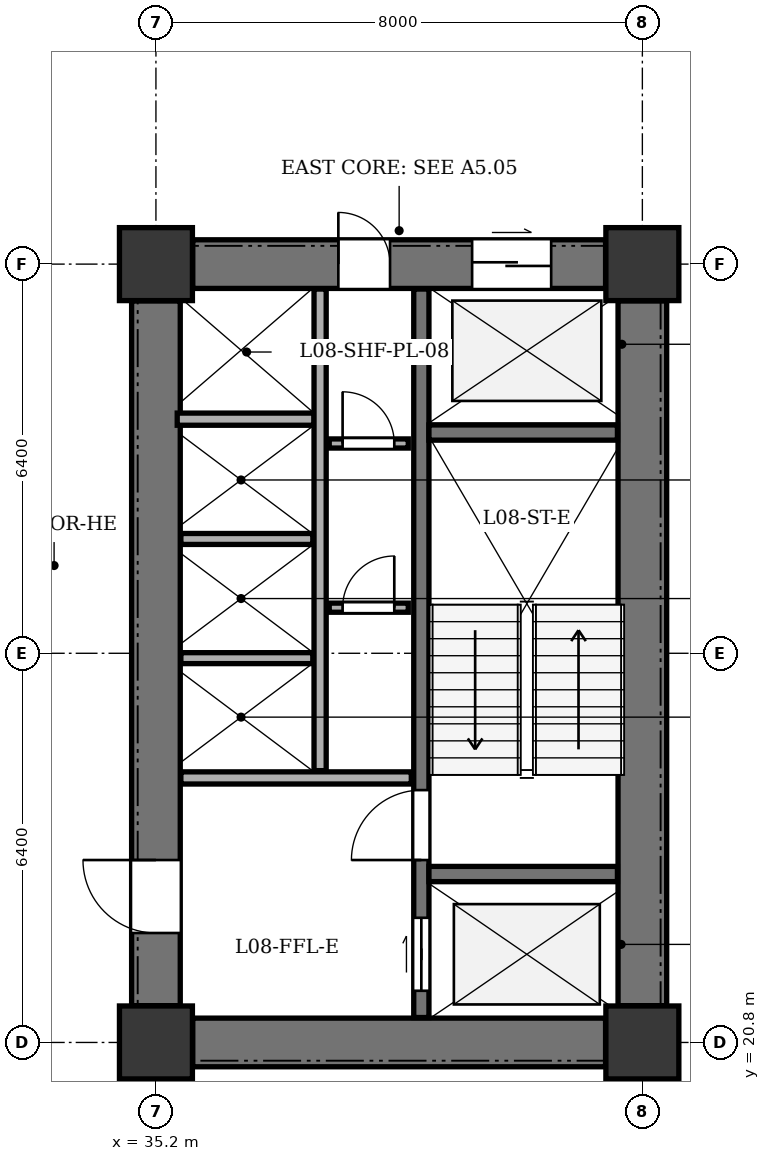
"""IFC4 building model, lengths in metres.
Left out: names, types, materials, properties, quantities, classifications, styles, units other than length and angle.
Written with IfcOpenShell. Run it as: python <this file> out.ifc"""

import sys

from ifc_helpers import new_model, si_unit, direction, frame, frame_2d, origin, origin_2d, place, context, subcontext, project, spatial, rectangle, extrude, element, fill, save


model = new_model("IFC4")
c1 = context("Model", 3, precision=1e-05, world=origin(), true_north=direction((0.0, 1.0)))
c2 = subcontext(c1, "Body", "Model", "MODEL_VIEW")
j1 = project(units=[si_unit("LENGTHUNIT", "METRE"), si_unit("PLANEANGLEUNIT", "RADIAN")], contexts=[c1])
p1 = place(None, origin())
s1 = spatial("IfcSite", under=j1, at=p1, CompositionType="ELEMENT")
p2 = place(p1, origin())
s2 = spatial("IfcBuilding", under=s1, at=p2, CompositionType="ELEMENT")
p3 = place(p2, frame((0.0, 0.0, 36.0)))
s3 = spatial("IfcBuildingStorey", under=s2, at=p3, CompositionType="ELEMENT", Elevation=36.0)
for number, where, z_axis, x_axis in (
    (1, (35.2, 20.8, 0.0), (0.0, 0.0, 1.0), (1.0, 0.0, 0.0)),
    (2, (43.2, 20.8, 0.0), (0.0, 0.0, 1.0), (1.0, 0.0, 0.0)),
    (3, (35.2, 33.6, 0.0), (0.0, 0.0, 1.0), (1.0, 0.0, 0.0)),
    (4, (43.2, 33.6, 0.0), (0.0, 0.0, 1.0), (1.0, 0.0, 0.0)),
):
    element("IfcColumn", number, at=place(p3, frame(where, z_axis=z_axis, x_axis=x_axis)), inside=s3, PredefinedType="COLUMN", context=c2, shape_type="SweptSolid", body=[
        extrude(rectangle(XDim=1.2, YDim=1.2, at=origin_2d()), origin(), (0.0, 0.0, 1.0), 3.9),
    ])
p4 = place(p3, frame((43.2, 21.405, 0.0), z_axis=(0.0, 0.0, 1.0), x_axis=(0.0, 1.0, 0.0)))
e5 = element("IfcWall", 5, at=p4, inside=s3, PredefinedType="SHEAR", context=c2, shape_type="SweptSolid", body=[
    extrude(rectangle(XDim=11.59, YDim=0.8, at=frame_2d((5.795, 0.0))), origin(), (0.0, 0.0, 1.0), 3.6),
])
p5 = place(p3, frame((35.805, 20.8, 0.0), z_axis=(0.0, 0.0, 1.0), x_axis=(1.0, 0.0, 0.0)))
e6 = element("IfcWall", 6, at=p5, inside=s3, PredefinedType="SHEAR", context=c2, shape_type="SweptSolid", body=[
    extrude(rectangle(XDim=6.79, YDim=0.8, at=frame_2d((3.395, 0.0))), origin(), (0.0, 0.0, 1.0), 3.6),
])
p6 = place(p3, frame((35.805, 33.6, 0.0), z_axis=(0.0, 0.0, 1.0), x_axis=(1.0, 0.0, 0.0)))
e7 = element("IfcWall", 7, at=p6, inside=s3, PredefinedType="SHEAR", context=c2, shape_type="SweptSolid", body=[
    extrude(rectangle(XDim=6.79, YDim=0.8, at=frame_2d((3.395, 0.0))), origin(), (0.0, 0.0, 1.0), 3.6),
])
p7 = place(p6, frame((4.595, 0.0, 0.0)))
e8 = element("IfcOpeningElement", 8, at=p7, cuts=e7, PredefinedType="OPENING", context=c2, shape_type="SweptSolid", body=[
    extrude(rectangle(XDim=1.3, YDim=2.15, at=frame_2d((0.65, 1.075))), frame((0.0, 0.41, 0.0), z_axis=(0.0, -1.0, 0.0), x_axis=(1.0, 0.0, 0.0)), (0.0, 0.0, 1.0), 0.82),
])
p8 = place(p6, frame((2.395, 0.0, 0.0)))
e9 = element("IfcOpeningElement", 9, at=p8, cuts=e7, PredefinedType="OPENING", context=c2, shape_type="SweptSolid", body=[
    extrude(rectangle(XDim=0.85, YDim=2.02, at=frame_2d((0.425, 1.01))), frame((0.0, 0.41, 0.0), z_axis=(0.0, -1.0, 0.0), x_axis=(1.0, 0.0, 0.0)), (0.0, 0.0, 1.0), 0.82),
])
p9 = place(p3, frame((35.2, 21.405, 0.0), z_axis=(0.0, 0.0, 1.0), x_axis=(0.0, 1.0, 0.0)))
e10 = element("IfcWall", 10, at=p9, inside=s3, PredefinedType="SHEAR", context=c2, shape_type="SweptSolid", body=[
    extrude(rectangle(XDim=11.59, YDim=0.8, at=frame_2d((5.795, 0.0))), origin(), (0.0, 0.0, 1.0), 3.6),
])
p10 = place(p9, frame((1.195, 0.0, 0.0)))
e11 = element("IfcOpeningElement", 11, at=p10, cuts=e10, PredefinedType="OPENING", context=c2, shape_type="SweptSolid", body=[
    extrude(rectangle(XDim=1.2, YDim=2.15, at=frame_2d((0.6, 1.075))), frame((0.0, 0.41, 0.0), z_axis=(0.0, -1.0, 0.0), x_axis=(1.0, 0.0, 0.0)), (0.0, 0.0, 1.0), 0.82),
])
p11 = place(p3, frame((39.565, 21.21, 0.0), z_axis=(0.0, 0.0, 1.0), x_axis=(0.0, 1.0, 0.0)))
e12 = element("IfcWall", 12, at=p11, inside=s3, PredefinedType="SHEAR", context=c2, shape_type="SweptSolid", body=[
    extrude(rectangle(XDim=11.98, YDim=0.25, at=frame_2d((5.99, 0.0))), origin(), (0.0, 0.0, 1.0), 3.6),
])
p12 = place(p11, frame((0.44, 0.0, 0.0)))
e13 = element("IfcOpeningElement", 13, at=p12, cuts=e12, PredefinedType="OPENING", context=c2, shape_type="SweptSolid", body=[
    extrude(rectangle(XDim=1.2, YDim=2.15, at=frame_2d((0.6, 1.075))), frame((0.0, 0.135, 0.0), z_axis=(0.0, -1.0, 0.0), x_axis=(1.0, 0.0, 0.0)), (0.0, 0.0, 1.0), 0.27),
])
p13 = place(p11, frame((2.59, 0.0, 0.0)))
e14 = element("IfcOpeningElement", 14, at=p13, cuts=e12, PredefinedType="OPENING", context=c2, shape_type="SweptSolid", body=[
    extrude(rectangle(XDim=1.15, YDim=2.15, at=frame_2d((0.575, 1.075))), frame((0.0, 0.135, 0.0), z_axis=(0.0, -1.0, 0.0), x_axis=(1.0, 0.0, 0.0)), (0.0, 0.0, 1.0), 0.27),
])
for number, where, z_axis, x_axis in (
    (15, (39.69, 23.57, 0.0), (0.0, 0.0, 1.0), (1.0, 0.0, 0.0)),
    (16, (39.69, 30.83, 0.0), (0.0, 0.0, 1.0), (1.0, 0.0, 0.0)),
):
    element("IfcWall", number, at=place(p3, frame(where, z_axis=z_axis, x_axis=x_axis)), inside=s3, PredefinedType="SHEAR", context=c2, shape_type="SweptSolid", body=[
        extrude(rectangle(XDim=3.1, YDim=0.25, at=frame_2d((1.55, 0.0))), origin(), (0.0, 0.0, 1.0), 3.6),
    ])
p14 = place(p3, frame((35.61, 25.15, 0.0), z_axis=(0.0, 0.0, 1.0), x_axis=(1.0, 0.0, 0.0)))
e17 = element("IfcWall", 17, at=p14, inside=s3, PredefinedType="SOLIDWALL", context=c2, shape_type="SweptSolid", body=[
    extrude(rectangle(XDim=3.79, YDim=0.2, at=frame_2d((1.895, 0.0))), origin(), (0.0, 0.0, 1.0), 3.6),
])
p15 = place(p3, frame((35.55, 31.05, 0.0), z_axis=(0.0, 0.0, 1.0), x_axis=(1.0, 0.0, 0.0)))
e18 = element("IfcWall", 18, at=p15, inside=s3, PredefinedType="SOLIDWALL", context=c2, shape_type="SweptSolid", body=[
    extrude(rectangle(XDim=2.25, YDim=0.2, at=frame_2d((1.125, 0.0))), origin(), (0.0, 0.0, 1.0), 3.6),
])
p16 = place(p3, frame((37.9, 25.27, 0.0), z_axis=(0.0, 0.0, 1.0), x_axis=(0.0, 1.0, 0.0)))
e19 = element("IfcWall", 19, at=p16, inside=s3, PredefinedType="SOLIDWALL", context=c2, shape_type="SweptSolid", body=[
    extrude(rectangle(XDim=7.92, YDim=0.2, at=frame_2d((3.96, 0.0))), origin(), (0.0, 0.0, 1.0), 3.6),
])
for number, where, z_axis, x_axis in (
    (20, (35.61, 27.12, 0.0), (0.0, 0.0, 1.0), (1.0, 0.0, 0.0)),
    (21, (35.61, 29.08, 0.0), (0.0, 0.0, 1.0), (1.0, 0.0, 0.0)),
):
    element("IfcWall", number, at=place(p3, frame(where, z_axis=z_axis, x_axis=x_axis)), inside=s3, PredefinedType="PARTITIONING", context=c2, shape_type="SweptSolid", body=[
        extrude(rectangle(XDim=2.17, YDim=0.18, at=frame_2d((1.085, 0.0))), origin(), (0.0, 0.0, 1.0), 3.6),
    ])
p17 = place(p3, frame((38.05, 27.95, 0.0), z_axis=(0.0, 0.0, 1.0), x_axis=(1.0, 0.0, 0.0)))
e22 = element("IfcWall", 22, at=p17, inside=s3, PredefinedType="PARTITIONING", context=c2, shape_type="SweptSolid", body=[
    extrude(rectangle(XDim=1.3, YDim=0.15, at=frame_2d((0.65, 0.0))), origin(), (0.0, 0.0, 1.0), 3.6),
])
p18 = place(p17, frame((0.22, 0.0, 0.0)))
e23 = element("IfcOpeningElement", 23, at=p18, cuts=e22, PredefinedType="OPENING", context=c2, shape_type="SweptSolid", body=[
    extrude(rectangle(XDim=0.85, YDim=2.02, at=frame_2d((0.425, 1.01))), frame((0.0, 0.085, 0.0), z_axis=(0.0, -1.0, 0.0), x_axis=(1.0, 0.0, 0.0)), (0.0, 0.0, 1.0), 0.17),
])
p19 = place(p3, frame((38.05, 30.65, 0.0), z_axis=(0.0, 0.0, 1.0), x_axis=(1.0, 0.0, 0.0)))
e24 = element("IfcWall", 24, at=p19, inside=s3, PredefinedType="PARTITIONING", context=c2, shape_type="SweptSolid", body=[
    extrude(rectangle(XDim=1.3, YDim=0.15, at=frame_2d((0.65, 0.0))), origin(), (0.0, 0.0, 1.0), 3.6),
])
p20 = place(p19, frame((0.22, 0.0, 0.0)))
e25 = element("IfcOpeningElement", 25, at=p20, cuts=e24, PredefinedType="OPENING", context=c2, shape_type="SweptSolid", body=[
    extrude(rectangle(XDim=0.85, YDim=2.02, at=frame_2d((0.425, 1.01))), frame((0.0, 0.085, 0.0), z_axis=(0.0, -1.0, 0.0), x_axis=(1.0, 0.0, 0.0)), (0.0, 0.0, 1.0), 0.17),
])
p21 = place(p7, origin())
e26 = element("IfcDoor", 26, at=p21, inside=s3, OperationType="DOUBLE_DOOR_SLIDING", PredefinedType="DOOR", context=c2, shape_type="SweptSolid", body=[
    extrude(rectangle(XDim=1.3, YDim=2.15, at=frame_2d((0.65, 1.075))), frame((0.0, 0.025, 0.0), z_axis=(0.0, -1.0, 0.0), x_axis=(1.0, 0.0, 0.0)), (0.0, 0.0, 1.0), 0.05),
])
fill(e8, e26)
p22 = place(p8, origin())
e27 = element("IfcDoor", 27, at=p22, inside=s3, OperationType="SINGLE_SWING_LEFT", PredefinedType="DOOR", context=c2, shape_type="SweptSolid", body=[
    extrude(rectangle(XDim=0.85, YDim=2.02, at=frame_2d((0.425, 1.01))), frame((0.0, 0.025, 0.0), z_axis=(0.0, -1.0, 0.0), x_axis=(1.0, 0.0, 0.0)), (0.0, 0.0, 1.0), 0.05),
])
fill(e9, e27)
p23 = place(p10, origin())
e28 = element("IfcDoor", 28, at=p23, inside=s3, OperationType="SINGLE_SWING_RIGHT", PredefinedType="DOOR", context=c2, shape_type="SweptSolid", body=[
    extrude(rectangle(XDim=1.2, YDim=2.15, at=frame_2d((0.6, 1.075))), frame((0.0, 0.025, 0.0), z_axis=(0.0, -1.0, 0.0), x_axis=(1.0, 0.0, 0.0)), (0.0, 0.0, 1.0), 0.05),
])
fill(e11, e28)
p24 = place(p12, origin())
e29 = element("IfcDoor", 29, at=p24, inside=s3, OperationType="DOUBLE_DOOR_SLIDING", PredefinedType="DOOR", context=c2, shape_type="SweptSolid", body=[
    extrude(rectangle(XDim=1.2, YDim=2.15, at=frame_2d((0.6, 1.075))), frame((0.0, 0.025, 0.0), z_axis=(0.0, -1.0, 0.0), x_axis=(1.0, 0.0, 0.0)), (0.0, 0.0, 1.0), 0.05),
])
fill(e13, e29)
p25 = place(p13, origin())
e30 = element("IfcDoor", 30, at=p25, inside=s3, OperationType="SINGLE_SWING_LEFT", PredefinedType="DOOR", context=c2, shape_type="SweptSolid", body=[
    extrude(rectangle(XDim=1.15, YDim=2.15, at=frame_2d((0.575, 1.075))), frame((0.0, 0.025, 0.0), z_axis=(0.0, -1.0, 0.0), x_axis=(1.0, 0.0, 0.0)), (0.0, 0.0, 1.0), 0.05),
])
fill(e14, e30)
p26 = place(p18, origin())
e31 = element("IfcDoor", 31, at=p26, inside=s3, OperationType="SINGLE_SWING_RIGHT", PredefinedType="DOOR", context=c2, shape_type="SweptSolid", body=[
    extrude(rectangle(XDim=0.85, YDim=2.02, at=frame_2d((0.425, 1.01))), frame((0.0, 0.025, 0.0), z_axis=(0.0, -1.0, 0.0), x_axis=(1.0, 0.0, 0.0)), (0.0, 0.0, 1.0), 0.05),
])
fill(e23, e31)
p27 = place(p20, origin())
e32 = element("IfcDoor", 32, at=p27, inside=s3, OperationType="SINGLE_SWING_LEFT", PredefinedType="DOOR", context=c2, shape_type="SweptSolid", body=[
    extrude(rectangle(XDim=0.85, YDim=2.02, at=frame_2d((0.425, 1.01))), frame((0.0, 0.025, 0.0), z_axis=(0.0, -1.0, 0.0), x_axis=(1.0, 0.0, 0.0)), (0.0, 0.0, 1.0), 0.05),
])
fill(e25, e32)
save(model, sys.argv[1])
